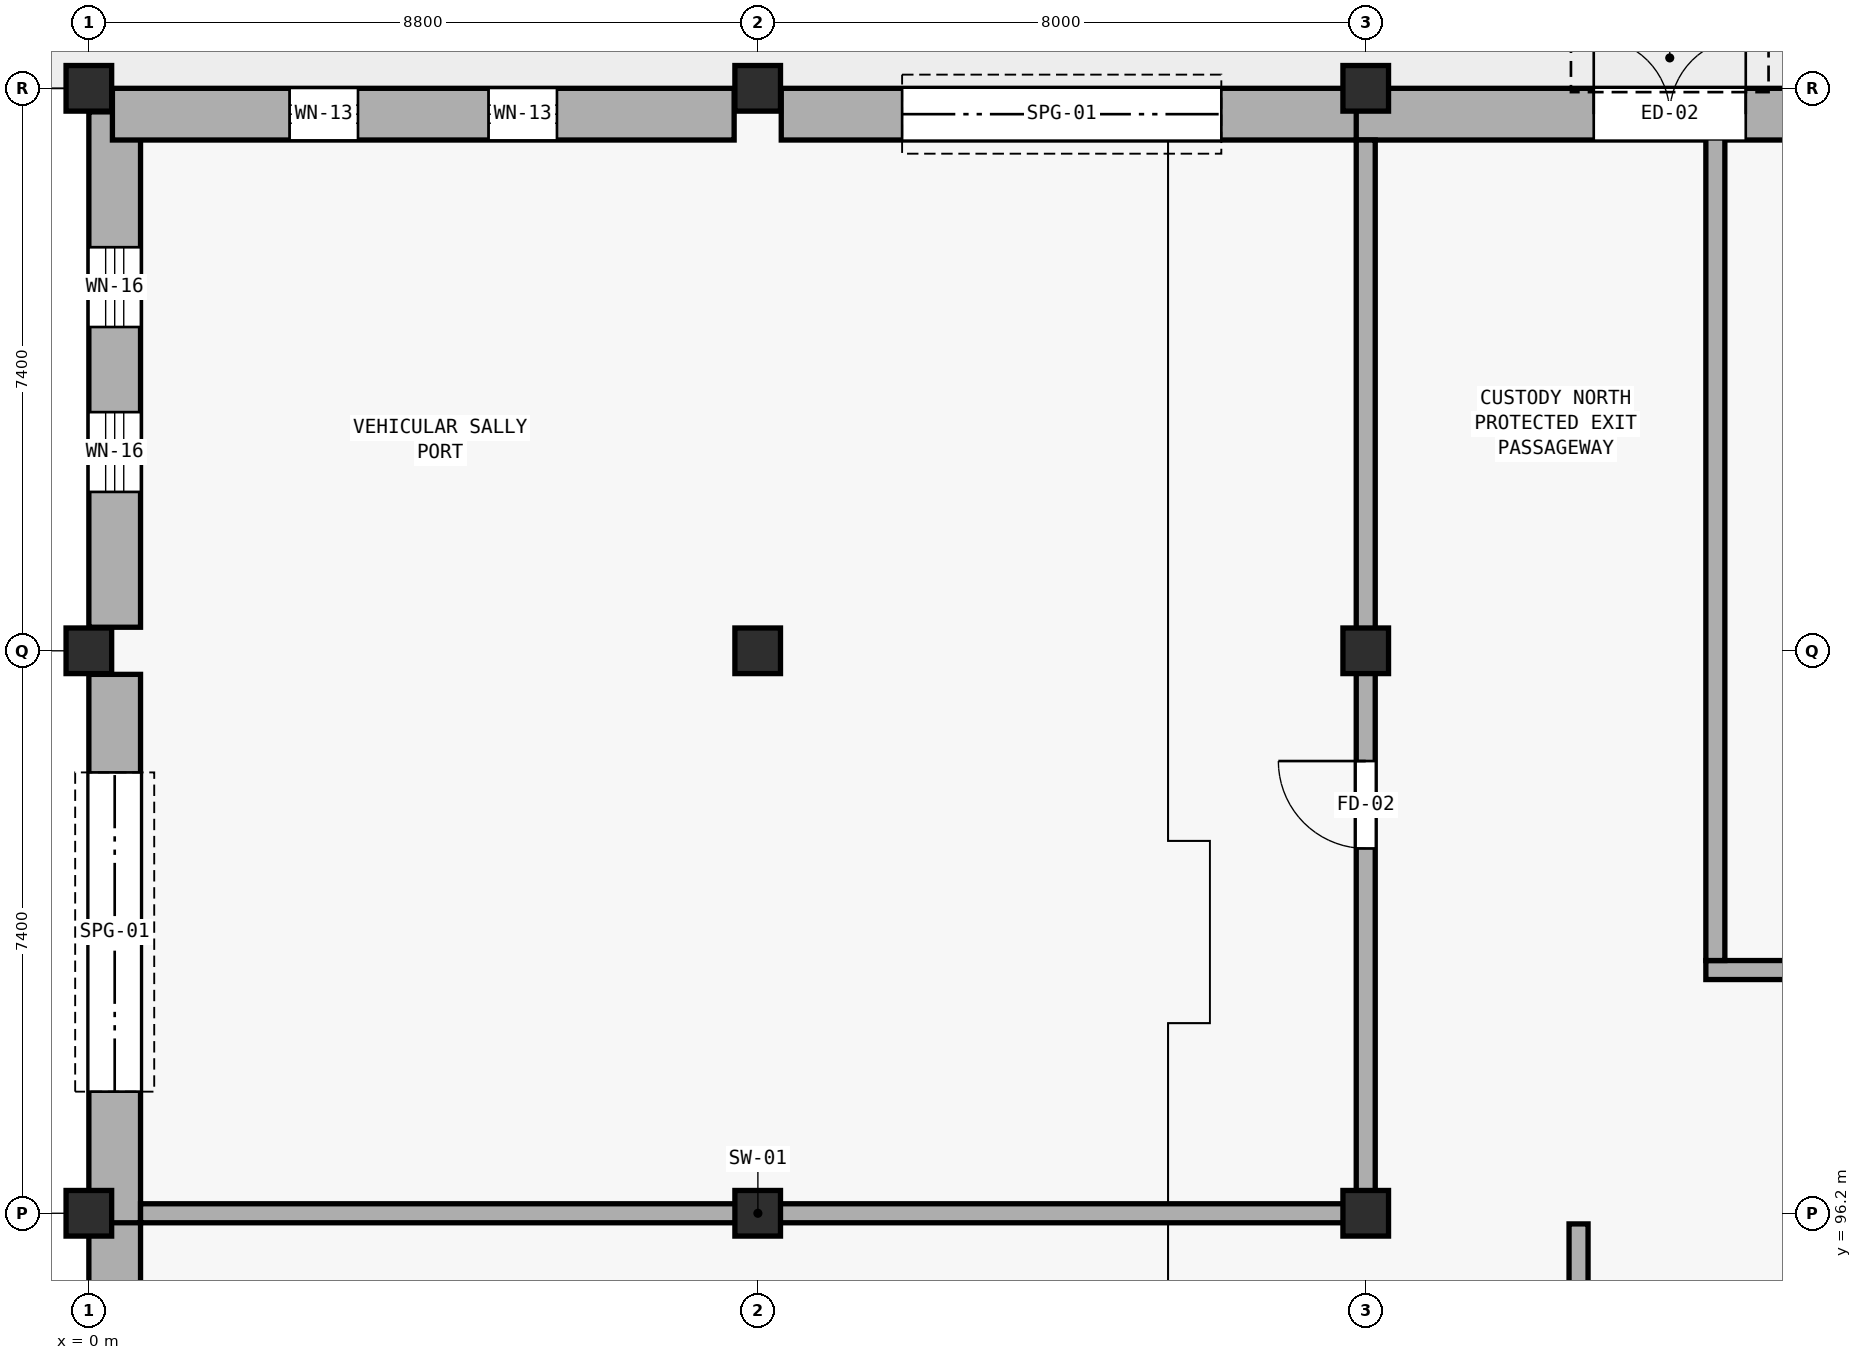
"""IFC4 building model, lengths in metres.
Left out: names, types, materials, properties, quantities, classifications, styles, units other than length and angle.
Written with IfcOpenShell. Run it as: python <this file> out.ifc"""

import sys

from ifc_helpers import new_model, si_unit, direction, frame, frame_2d, origin, origin_2d, place, context, subcontext, project, spatial, rectangle, extrude, element, fill, save


model = new_model("IFC4")
c1 = context("Model", 3, precision=1e-05, world=origin(), true_north=direction((0.0, 1.0)))
c2 = subcontext(c1, "Body", "Model", "MODEL_VIEW")
j1 = project(units=[si_unit("LENGTHUNIT", "METRE"), si_unit("PLANEANGLEUNIT", "RADIAN")], contexts=[c1])
p1 = place(None, origin())
s1 = spatial("IfcSite", under=j1, at=p1, CompositionType="ELEMENT")
p2 = place(p1, origin())
s2 = spatial("IfcBuilding", under=s1, at=p2, CompositionType="ELEMENT")
p3 = place(p2, origin())
s3 = spatial("IfcBuildingStorey", under=s2, at=p3, CompositionType="ELEMENT", Elevation=0.0)
for number, where, z_axis, x_axis in (
    (1, (0.0, 96.2, 0.0), (0.0, 0.0, 1.0), (1.0, 0.0, 0.0)),
    (2, (0.0, 103.6, 0.0), (0.0, 0.0, 1.0), (1.0, 0.0, 0.0)),
    (3, (0.0, 111.0, 0.0), (0.0, 0.0, 1.0), (1.0, 0.0, 0.0)),
    (4, (8.8, 96.2, 0.0), (0.0, 0.0, 1.0), (1.0, 0.0, 0.0)),
    (5, (8.8, 103.6, 0.0), (0.0, 0.0, 1.0), (1.0, 0.0, 0.0)),
    (6, (8.8, 111.0, 0.0), (0.0, 0.0, 1.0), (1.0, 0.0, 0.0)),
    (7, (16.8, 96.2, 0.0), (0.0, 0.0, 1.0), (1.0, 0.0, 0.0)),
    (8, (16.8, 103.6, 0.0), (0.0, 0.0, 1.0), (1.0, 0.0, 0.0)),
    (9, (16.8, 111.0, 0.0), (0.0, 0.0, 1.0), (1.0, 0.0, 0.0)),
):
    element("IfcColumn", number, at=place(p3, frame(where, z_axis=z_axis, x_axis=x_axis)), inside=s3, PredefinedType="COLUMN", context=c2, shape_type="SweptSolid", body=[
        extrude(rectangle(XDim=0.6, YDim=0.6, at=origin_2d()), origin(), (0.0, 0.0, 1.0), 5.4),
    ])
p4 = place(p3, frame((0.34, 89.11, 0.0), z_axis=(0.0, 0.0, 1.0), x_axis=(0.0, 1.0, 0.0)))
e10 = element("IfcWall", 10, at=p4, inside=s3, PredefinedType="SOLIDWALL", context=c2, shape_type="SweptSolid", body=[
    extrude(rectangle(XDim=7.215, YDim=0.68, at=frame_2d((3.607, 0.0))), origin(), (0.0, 0.0, 1.0), 5.14),
])
p5 = place(p4, frame((1.855, 0.0, 1.8)))
e11 = element("IfcOpeningElement", 11, at=p5, cuts=e10, PredefinedType="OPENING", context=c2, shape_type="SweptSolid", body=[
    extrude(rectangle(XDim=0.9, YDim=1.15, at=frame_2d((0.45, 0.575))), frame((0.0, 0.35, 0.0), z_axis=(0.0, -1.0, 0.0), x_axis=(1.0, 0.0, 0.0)), (0.0, 0.0, 1.0), 0.7),
])
p6 = place(p4, frame((4.025, 0.0, 1.8)))
e12 = element("IfcOpeningElement", 12, at=p6, cuts=e10, PredefinedType="OPENING", context=c2, shape_type="SweptSolid", body=[
    extrude(rectangle(XDim=0.9, YDim=1.15, at=frame_2d((0.45, 0.575))), frame((0.0, 0.35, 0.0), z_axis=(0.0, -1.0, 0.0), x_axis=(1.0, 0.0, 0.0)), (0.0, 0.0, 1.0), 0.7),
])
p7 = place(p3, frame((0.34, 96.075, 0.0), z_axis=(0.0, 0.0, 1.0), x_axis=(0.0, 1.0, 0.0)))
e13 = element("IfcWall", 13, at=p7, inside=s3, PredefinedType="SOLIDWALL", context=c2, shape_type="SweptSolid", body=[
    extrude(rectangle(XDim=7.215, YDim=0.68, at=frame_2d((3.607, 0.0))), origin(), (0.0, 0.0, 1.0), 5.14),
])
p8 = place(p7, frame((1.725, 0.0, 0.0)))
e14 = element("IfcOpeningElement", 14, at=p8, cuts=e13, PredefinedType="OPENING", context=c2, shape_type="SweptSolid", body=[
    extrude(rectangle(XDim=4.2, YDim=4.2, at=frame_2d((2.1, 2.1))), frame((0.0, 0.35, 0.0), z_axis=(0.0, -1.0, 0.0), x_axis=(1.0, 0.0, 0.0)), (0.0, 0.0, 1.0), 0.7),
])
p9 = place(p3, frame((0.34, 103.91, 0.0), z_axis=(0.0, 0.0, 1.0), x_axis=(0.0, 1.0, 0.0)))
e15 = element("IfcWall", 15, at=p9, inside=s3, PredefinedType="SOLIDWALL", context=c2, shape_type="SweptSolid", body=[
    extrude(rectangle(XDim=6.78, YDim=0.68, at=frame_2d((3.39, 0.0))), origin(), (0.0, 0.0, 1.0), 5.14),
])
p10 = place(p9, frame((1.78, 0.0, 1.8)))
e16 = element("IfcOpeningElement", 16, at=p10, cuts=e15, PredefinedType="OPENING", context=c2, shape_type="SweptSolid", body=[
    extrude(rectangle(XDim=1.05, YDim=1.2, at=frame_2d((0.525, 0.6))), frame((0.0, 0.35, 0.0), z_axis=(0.0, -1.0, 0.0), x_axis=(1.0, 0.0, 0.0)), (0.0, 0.0, 1.0), 0.7),
])
p11 = place(p9, frame((3.95, 0.0, 1.8)))
e17 = element("IfcOpeningElement", 17, at=p11, cuts=e15, PredefinedType="OPENING", context=c2, shape_type="SweptSolid", body=[
    extrude(rectangle(XDim=1.05, YDim=1.2, at=frame_2d((0.525, 0.6))), frame((0.0, 0.35, 0.0), z_axis=(0.0, -1.0, 0.0), x_axis=(1.0, 0.0, 0.0)), (0.0, 0.0, 1.0), 0.7),
])
p12 = place(p3, frame((0.31, 110.66, 0.0), z_axis=(0.0, 0.0, 1.0), x_axis=(1.0, 0.0, 0.0)))
e18 = element("IfcWall", 18, at=p12, inside=s3, PredefinedType="SOLIDWALL", context=c2, shape_type="SweptSolid", body=[
    extrude(rectangle(XDim=8.18, YDim=0.68, at=frame_2d((4.09, 0.0))), origin(), (0.0, 0.0, 1.0), 5.14),
])
p13 = place(p12, frame((2.331, 0.0, 1.8)))
e19 = element("IfcOpeningElement", 19, at=p13, cuts=e18, PredefinedType="OPENING", context=c2, shape_type="SweptSolid", body=[
    extrude(rectangle(XDim=0.9, YDim=0.9, at=frame_2d((0.45, 0.45))), frame((0.0, 0.35, 0.0), z_axis=(0.0, -1.0, 0.0), x_axis=(1.0, 0.0, 0.0)), (0.0, 0.0, 1.0), 0.7),
])
p14 = place(p12, frame((4.949, 0.0, 1.8)))
e20 = element("IfcOpeningElement", 20, at=p14, cuts=e18, PredefinedType="OPENING", context=c2, shape_type="SweptSolid", body=[
    extrude(rectangle(XDim=0.9, YDim=0.9, at=frame_2d((0.45, 0.45))), frame((0.0, 0.35, 0.0), z_axis=(0.0, -1.0, 0.0), x_axis=(1.0, 0.0, 0.0)), (0.0, 0.0, 1.0), 0.7),
])
p15 = place(p3, frame((9.11, 110.66, 0.0), z_axis=(0.0, 0.0, 1.0), x_axis=(1.0, 0.0, 0.0)))
e21 = element("IfcWall", 21, at=p15, inside=s3, PredefinedType="SOLIDWALL", context=c2, shape_type="SweptSolid", body=[
    extrude(rectangle(XDim=7.815, YDim=0.68, at=frame_2d((3.907, 0.0))), origin(), (0.0, 0.0, 1.0), 5.14),
])
p16 = place(p15, frame((1.59, 0.0, 0.0)))
e22 = element("IfcOpeningElement", 22, at=p16, cuts=e21, PredefinedType="OPENING", context=c2, shape_type="SweptSolid", body=[
    extrude(rectangle(XDim=4.2, YDim=4.2, at=frame_2d((2.1, 2.1))), frame((0.0, 0.35, 0.0), z_axis=(0.0, -1.0, 0.0), x_axis=(1.0, 0.0, 0.0)), (0.0, 0.0, 1.0), 0.7),
])
p17 = place(p3, frame((16.675, 110.66, 0.0), z_axis=(0.0, 0.0, 1.0), x_axis=(1.0, 0.0, 0.0)))
e23 = element("IfcWall", 23, at=p17, inside=s3, PredefinedType="SOLIDWALL", context=c2, shape_type="SweptSolid", body=[
    extrude(rectangle(XDim=7.815, YDim=0.68, at=frame_2d((3.907, 0.0))), origin(), (0.0, 0.0, 1.0), 5.14),
])
p18 = place(p17, frame((3.125, 0.0, 0.0)))
e24 = element("IfcOpeningElement", 24, at=p18, cuts=e23, PredefinedType="OPENING", context=c2, shape_type="SweptSolid", body=[
    extrude(rectangle(XDim=2.0, YDim=2.35, at=frame_2d((1.0, 1.175))), frame((0.0, 0.35, 0.0), z_axis=(0.0, -1.0, 0.0), x_axis=(1.0, 0.0, 0.0)), (0.0, 0.0, 1.0), 0.7),
])
p19 = place(p3, frame((0.68, 96.2, 0.0), z_axis=(0.0, 0.0, 1.0), x_axis=(1.0, 0.0, 0.0)))
e25 = element("IfcWall", 25, at=p19, inside=s3, PredefinedType="SOLIDWALL", context=c2, shape_type="SweptSolid", body=[
    extrude(rectangle(XDim=16.245, YDim=0.25, at=frame_2d((8.123, 0.0))), origin(), (0.0, 0.0, 1.0), 4.27),
])
p20 = place(p3, frame((16.8, 96.325, 0.0), z_axis=(0.0, 0.0, 1.0), x_axis=(0.0, 1.0, 0.0)))
e26 = element("IfcWall", 26, at=p20, inside=s3, PredefinedType="SOLIDWALL", context=c2, shape_type="SweptSolid", body=[
    extrude(rectangle(XDim=13.995, YDim=0.25, at=frame_2d((6.998, 0.0))), origin(), (0.0, 0.0, 1.0), 4.27),
])
p21 = place(p20, frame((4.675, 0.0, 0.0)))
e27 = element("IfcOpeningElement", 27, at=p21, cuts=e26, PredefinedType="OPENING", context=c2, shape_type="SweptSolid", body=[
    extrude(rectangle(XDim=1.15, YDim=2.15, at=frame_2d((0.575, 1.075))), frame((0.0, 0.135, 0.0), z_axis=(0.0, -1.0, 0.0), x_axis=(1.0, 0.0, 0.0)), (0.0, 0.0, 1.0), 0.27),
])
p22 = place(p3, frame((21.275, 99.4, 0.0), z_axis=(0.0, 0.0, 1.0), x_axis=(1.0, 0.0, 0.0)))
e28 = element("IfcWall", 28, at=p22, inside=s3, PredefinedType="SOLIDWALL", context=c2, shape_type="SweptSolid", body=[
    extrude(rectangle(XDim=13.125, YDim=0.25, at=frame_2d((6.562, 0.0))), origin(), (0.0, 0.0, 1.0), 4.27),
])
p23 = place(p22, frame((6.05, 0.0, 0.0)))
e29 = element("IfcOpeningElement", 29, at=p23, cuts=e28, PredefinedType="OPENING", context=c2, shape_type="SweptSolid", body=[
    extrude(rectangle(XDim=1.15, YDim=2.15, at=frame_2d((0.575, 1.075))), frame((0.0, 0.135, 0.0), z_axis=(0.0, -1.0, 0.0), x_axis=(1.0, 0.0, 0.0)), (0.0, 0.0, 1.0), 0.27),
])
p24 = place(p3, frame((21.4, 99.525, 0.0), z_axis=(0.0, 0.0, 1.0), x_axis=(0.0, 1.0, 0.0)))
e30 = element("IfcWall", 30, at=p24, inside=s3, PredefinedType="SOLIDWALL", context=c2, shape_type="SweptSolid", body=[
    extrude(rectangle(XDim=10.935, YDim=0.25, at=frame_2d((5.468, 0.0))), origin(), (0.0, 0.0, 1.0), 4.27),
])
p25 = place(p3, frame((19.6, 89.34, 0.0), z_axis=(0.0, 0.0, 1.0), x_axis=(0.0, 1.0, 0.0)))
e31 = element("IfcWall", 31, at=p25, inside=s3, PredefinedType="SOLIDWALL", context=c2, shape_type="SweptSolid", body=[
    extrude(rectangle(XDim=6.72, YDim=0.25, at=frame_2d((3.36, 0.0))), origin(), (0.0, 0.0, 1.0), 4.27),
])
p26 = place(p25, frame((2.835, 0.0, 0.0)))
e32 = element("IfcOpeningElement", 32, at=p26, cuts=e31, PredefinedType="OPENING", context=c2, shape_type="SweptSolid", body=[
    extrude(rectangle(XDim=1.05, YDim=2.15, at=frame_2d((0.525, 1.075))), frame((0.0, 0.135, 0.0), z_axis=(0.0, -1.0, 0.0), x_axis=(1.0, 0.0, 0.0)), (0.0, 0.0, 1.0), 0.27),
])
p27 = place(p8, origin())
e33 = element("IfcDoor", 33, at=p27, inside=s3, OperationType="ROLLINGUP", PredefinedType="USERDEFINED", context=c2, shape_type="SweptSolid", body=[
    extrude(rectangle(XDim=4.2, YDim=4.2, at=frame_2d((2.1, 2.1))), frame((0.0, 0.025, 0.0), z_axis=(0.0, -1.0, 0.0), x_axis=(1.0, 0.0, 0.0)), (0.0, 0.0, 1.0), 0.05),
])
fill(e14, e33)
p28 = place(p10, origin())
e34 = element("IfcWindow", 34, at=p28, inside=s3, PartitioningType="SINGLE_PANEL", PredefinedType="WINDOW", context=c2, shape_type="SweptSolid", body=[
    extrude(rectangle(XDim=1.05, YDim=1.2, at=frame_2d((0.525, 0.6))), frame((0.0, 0.03, 0.0), z_axis=(0.0, -1.0, 0.0), x_axis=(1.0, 0.0, 0.0)), (0.0, 0.0, 1.0), 0.06),
])
fill(e16, e34)
p29 = place(p11, origin())
e35 = element("IfcWindow", 35, at=p29, inside=s3, PartitioningType="SINGLE_PANEL", PredefinedType="WINDOW", context=c2, shape_type="SweptSolid", body=[
    extrude(rectangle(XDim=1.05, YDim=1.2, at=frame_2d((0.525, 0.6))), frame((0.0, 0.03, 0.0), z_axis=(0.0, -1.0, 0.0), x_axis=(1.0, 0.0, 0.0)), (0.0, 0.0, 1.0), 0.06),
])
fill(e17, e35)
p30 = place(p13, origin())
e36 = element("IfcWindow", 36, at=p30, inside=s3, PartitioningType="SINGLE_PANEL", PredefinedType="WINDOW", context=c2, shape_type="SweptSolid", body=[
    extrude(rectangle(XDim=0.9, YDim=0.9, at=frame_2d((0.45, 0.45))), frame((0.0, 0.03, 0.0), z_axis=(0.0, -1.0, 0.0), x_axis=(1.0, 0.0, 0.0)), (0.0, 0.0, 1.0), 0.06),
])
fill(e19, e36)
p31 = place(p14, origin())
e37 = element("IfcWindow", 37, at=p31, inside=s3, PartitioningType="SINGLE_PANEL", PredefinedType="WINDOW", context=c2, shape_type="SweptSolid", body=[
    extrude(rectangle(XDim=0.9, YDim=0.9, at=frame_2d((0.45, 0.45))), frame((0.0, 0.03, 0.0), z_axis=(0.0, -1.0, 0.0), x_axis=(1.0, 0.0, 0.0)), (0.0, 0.0, 1.0), 0.06),
])
fill(e20, e37)
p32 = place(p16, origin())
e38 = element("IfcDoor", 38, at=p32, inside=s3, OperationType="ROLLINGUP", PredefinedType="USERDEFINED", context=c2, shape_type="SweptSolid", body=[
    extrude(rectangle(XDim=4.2, YDim=4.2, at=frame_2d((2.1, 2.1))), frame((0.0, 0.025, 0.0), z_axis=(0.0, -1.0, 0.0), x_axis=(1.0, 0.0, 0.0)), (0.0, 0.0, 1.0), 0.05),
])
fill(e22, e38)
p33 = place(p18, origin())
e39 = element("IfcDoor", 39, at=p33, inside=s3, OperationType="DOUBLE_DOOR_SINGLE_SWING", PredefinedType="DOOR", context=c2, shape_type="SweptSolid", body=[
    extrude(rectangle(XDim=2.0, YDim=2.35, at=frame_2d((1.0, 1.175))), frame((0.0, 0.025, 0.0), z_axis=(0.0, -1.0, 0.0), x_axis=(1.0, 0.0, 0.0)), (0.0, 0.0, 1.0), 0.05),
])
fill(e24, e39)
p34 = place(p21, origin())
e40 = element("IfcDoor", 40, at=p34, inside=s3, OperationType="SINGLE_SWING_RIGHT", PredefinedType="DOOR", context=c2, shape_type="SweptSolid", body=[
    extrude(rectangle(XDim=1.15, YDim=2.15, at=frame_2d((0.575, 1.075))), frame((0.0, 0.025, 0.0), z_axis=(0.0, -1.0, 0.0), x_axis=(1.0, 0.0, 0.0)), (0.0, 0.0, 1.0), 0.05),
])
fill(e27, e40)
save(model, sys.argv[1])
